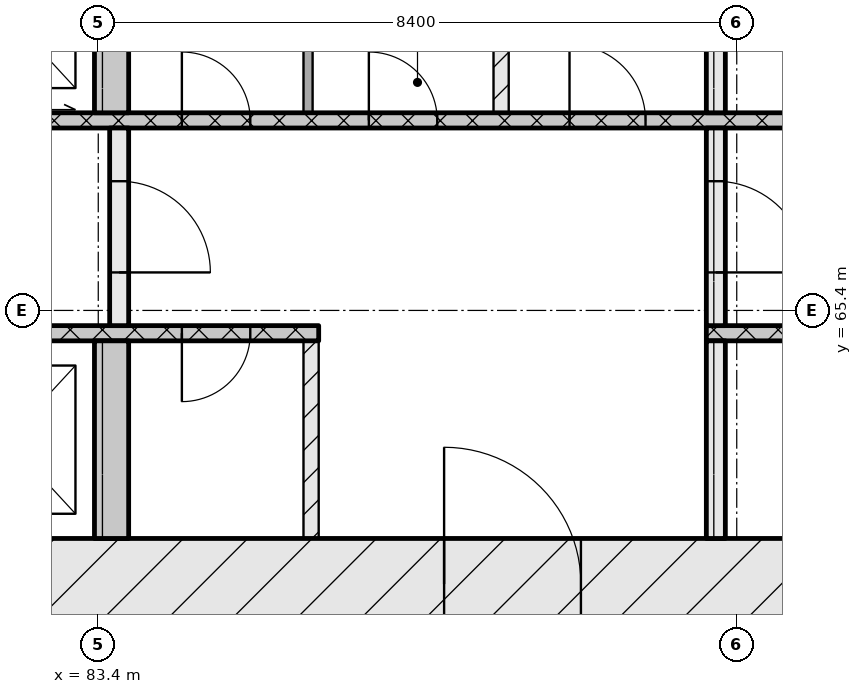
"""IFC4 building model, lengths in metres.
Left out: names, types, materials, properties, quantities, classifications, styles, units other than length and angle.
Written with IfcOpenShell. Run it as: python <this file> out.ifc"""

import sys

from ifc_helpers import new_model, si_unit, direction, frame, frame_2d, origin, place, context, subcontext, project, spatial, rectangle, extrude, element, fill, save


model = new_model("IFC4")
c1 = context("Model", 3, precision=1e-05, world=origin(), true_north=direction((0.0, 1.0)))
c2 = subcontext(c1, "Body", "Model", "MODEL_VIEW")
j1 = project(units=[si_unit("LENGTHUNIT", "METRE"), si_unit("PLANEANGLEUNIT", "RADIAN")], contexts=[c1])
p1 = place(None, origin())
s1 = spatial("IfcSite", under=j1, at=p1, CompositionType="ELEMENT")
p2 = place(p1, origin())
s2 = spatial("IfcBuilding", under=s1, at=p2, CompositionType="ELEMENT")
p3 = place(p2, frame((0.0, 0.0, 40.8)))
s3 = spatial("IfcBuildingStorey", under=s2, at=p3, CompositionType="ELEMENT", Elevation=40.8)
p4 = place(p3, frame((66.6, 61.8, 0.0), z_axis=(0.0, 0.0, 1.0), x_axis=(1.0, 0.0, 0.0)))
e1 = element("IfcWall", 1, at=p4, inside=s3, PredefinedType="SOLIDWALL", context=c2, shape_type="SweptSolid", body=[
    extrude(rectangle(XDim=42.0, YDim=1.2, at=frame_2d((21.0, 0.0))), origin(), (0.0, 0.0, 1.0), 3.32),
])
p5 = place(p4, frame((21.35, 0.0, 0.0)))
e2 = element("IfcOpeningElement", 2, at=p5, cuts=e1, PredefinedType="OPENING", context=c2, shape_type="SweptSolid", body=[
    extrude(rectangle(XDim=1.8, YDim=2.1, at=frame_2d((0.9, 1.05))), frame((0.0, 0.61, 0.0), z_axis=(0.0, -1.0, 0.0), x_axis=(1.0, 0.0, 0.0)), (0.0, 0.0, 1.0), 1.22),
])
p6 = place(p3, frame((83.575, 62.4, 0.0), z_axis=(0.0, 0.0, 1.0), x_axis=(0.0, 1.0, 0.0)))
e3 = element("IfcWall", 3, at=p6, inside=s3, PredefinedType="SOLIDWALL", context=c2, shape_type="SweptSolid", body=[
    extrude(rectangle(XDim=2.6, YDim=0.45, at=frame_2d((1.3, 0.0))), origin(), (0.0, 0.0, 1.0), 3.32),
])
p7 = place(p3, frame((86.2, 62.4, 0.0), z_axis=(0.0, 0.0, 1.0), x_axis=(0.0, 1.0, 0.0)))
e4 = element("IfcWall", 4, at=p7, inside=s3, PredefinedType="PARTITIONING", context=c2, shape_type="SweptSolid", body=[
    extrude(rectangle(XDim=2.6, YDim=0.2, at=frame_2d((1.3, 0.0))), origin(), (0.0, 0.0, 1.0), 3.32),
])
p8 = place(p3, frame((91.525, 62.4, 0.0), z_axis=(0.0, 0.0, 1.0), x_axis=(0.0, 1.0, 0.0)))
e5 = element("IfcWall", 5, at=p8, inside=s3, PredefinedType="SOLIDWALL", context=c2, shape_type="SweptSolid", body=[
    extrude(rectangle(XDim=2.6, YDim=0.25, at=frame_2d((1.3, 0.0))), origin(), (0.0, 0.0, 1.0), 3.32),
])
p9 = place(p3, frame((67.8, 65.1, 0.0), z_axis=(0.0, 0.0, 1.0), x_axis=(1.0, 0.0, 0.0)))
e6 = element("IfcWall", 6, at=p9, inside=s3, PredefinedType="SOLIDWALL", context=c2, shape_type="SweptSolid", body=[
    extrude(rectangle(XDim=18.5, YDim=0.2, at=frame_2d((9.25, 0.0))), origin(), (0.0, 0.0, 1.0), 3.32),
])
p10 = place(p9, frame((7.27, 0.0, 0.0)))
e7 = element("IfcOpeningElement", 7, at=p10, cuts=e6, PredefinedType="OPENING", context=c2, shape_type="SweptSolid", body=[
    extrude(rectangle(XDim=0.9, YDim=2.1, at=frame_2d((0.45, 1.05))), frame((0.0, 0.11, 0.0), z_axis=(0.0, -1.0, 0.0), x_axis=(1.0, 0.0, 0.0)), (0.0, 0.0, 1.0), 0.22),
])
p11 = place(p9, frame((8.85, 0.0, 0.0)))
e8 = element("IfcOpeningElement", 8, at=p11, cuts=e6, PredefinedType="OPENING", context=c2, shape_type="SweptSolid", body=[
    extrude(rectangle(XDim=1.1, YDim=2.1, at=frame_2d((0.55, 1.05))), frame((0.0, 0.11, 0.0), z_axis=(0.0, -1.0, 0.0), x_axis=(1.0, 0.0, 0.0)), (0.0, 0.0, 1.0), 0.22),
])
p12 = place(p9, frame((11.35, 0.0, 0.0)))
e9 = element("IfcOpeningElement", 9, at=p12, cuts=e6, PredefinedType="OPENING", context=c2, shape_type="SweptSolid", body=[
    extrude(rectangle(XDim=1.1, YDim=2.1, at=frame_2d((0.55, 1.05))), frame((0.0, 0.11, 0.0), z_axis=(0.0, -1.0, 0.0), x_axis=(1.0, 0.0, 0.0)), (0.0, 0.0, 1.0), 0.22),
])
p13 = place(p9, frame((13.85, 0.0, 0.0)))
e10 = element("IfcOpeningElement", 10, at=p13, cuts=e6, PredefinedType="OPENING", context=c2, shape_type="SweptSolid", body=[
    extrude(rectangle(XDim=1.1, YDim=2.1, at=frame_2d((0.55, 1.05))), frame((0.0, 0.11, 0.0), z_axis=(0.0, -1.0, 0.0), x_axis=(1.0, 0.0, 0.0)), (0.0, 0.0, 1.0), 0.22),
])
p14 = place(p9, frame((16.7, 0.0, 0.0)))
e11 = element("IfcOpeningElement", 11, at=p14, cuts=e6, PredefinedType="OPENING", context=c2, shape_type="SweptSolid", body=[
    extrude(rectangle(XDim=0.9, YDim=2.1, at=frame_2d((0.45, 1.05))), frame((0.0, 0.11, 0.0), z_axis=(0.0, -1.0, 0.0), x_axis=(1.0, 0.0, 0.0)), (0.0, 0.0, 1.0), 0.22),
])
p15 = place(p3, frame((91.4, 65.1, 0.0), z_axis=(0.0, 0.0, 1.0), x_axis=(1.0, 0.0, 0.0)))
e12 = element("IfcWall", 12, at=p15, inside=s3, PredefinedType="SOLIDWALL", context=c2, shape_type="SweptSolid", body=[
    extrude(rectangle(XDim=16.0, YDim=0.2, at=frame_2d((8.0, 0.0))), origin(), (0.0, 0.0, 1.0), 3.32),
])
p16 = place(p15, frame((7.83, 0.0, 0.0)))
e13 = element("IfcOpeningElement", 13, at=p16, cuts=e12, PredefinedType="OPENING", context=c2, shape_type="SweptSolid", body=[
    extrude(rectangle(XDim=0.9, YDim=2.1, at=frame_2d((0.45, 1.05))), frame((0.0, 0.11, 0.0), z_axis=(0.0, -1.0, 0.0), x_axis=(1.0, 0.0, 0.0)), (0.0, 0.0, 1.0), 0.22),
])
p17 = place(p3, frame((83.675, 65.2, 0.0), z_axis=(0.0, 0.0, 1.0), x_axis=(0.0, 1.0, 0.0)))
e14 = element("IfcWall", 14, at=p17, inside=s3, PredefinedType="SOLIDWALL", context=c2, shape_type="SweptSolid", body=[
    extrude(rectangle(XDim=2.6, YDim=0.25, at=frame_2d((1.3, 0.0))), origin(), (0.0, 0.0, 1.0), 3.32),
])
p18 = place(p17, frame((0.7, 0.0, 0.0)))
e15 = element("IfcOpeningElement", 15, at=p18, cuts=e14, PredefinedType="OPENING", context=c2, shape_type="SweptSolid", body=[
    extrude(rectangle(XDim=1.2, YDim=2.1, at=frame_2d((0.6, 1.05))), frame((0.0, 0.135, 0.0), z_axis=(0.0, -1.0, 0.0), x_axis=(1.0, 0.0, 0.0)), (0.0, 0.0, 1.0), 0.27),
])
p19 = place(p3, frame((91.525, 65.2, 0.0), z_axis=(0.0, 0.0, 1.0), x_axis=(0.0, 1.0, 0.0)))
e16 = element("IfcWall", 16, at=p19, inside=s3, PredefinedType="SOLIDWALL", context=c2, shape_type="SweptSolid", body=[
    extrude(rectangle(XDim=2.6, YDim=0.25, at=frame_2d((1.3, 0.0))), origin(), (0.0, 0.0, 1.0), 3.32),
])
p20 = place(p19, frame((0.7, 0.0, 0.0)))
e17 = element("IfcOpeningElement", 17, at=p20, cuts=e16, PredefinedType="OPENING", context=c2, shape_type="SweptSolid", body=[
    extrude(rectangle(XDim=1.2, YDim=2.1, at=frame_2d((0.6, 1.05))), frame((0.0, 0.135, 0.0), z_axis=(0.0, -1.0, 0.0), x_axis=(1.0, 0.0, 0.0)), (0.0, 0.0, 1.0), 0.27),
])
p21 = place(p3, frame((76.05, 67.9, 0.0), z_axis=(0.0, 0.0, 1.0), x_axis=(1.0, 0.0, 0.0)))
e18 = element("IfcWall", 18, at=p21, inside=s3, PredefinedType="SOLIDWALL", context=c2, shape_type="SweptSolid", body=[
    extrude(rectangle(XDim=23.1, YDim=0.2, at=frame_2d((11.55, 0.0))), origin(), (0.0, 0.0, 1.0), 3.32),
])
p22 = place(p21, frame((0.6, 0.0, 0.0)))
e19 = element("IfcOpeningElement", 19, at=p22, cuts=e18, PredefinedType="OPENING", context=c2, shape_type="SweptSolid", body=[
    extrude(rectangle(XDim=1.1, YDim=2.1, at=frame_2d((0.55, 1.05))), frame((0.0, 0.11, 0.0), z_axis=(0.0, -1.0, 0.0), x_axis=(1.0, 0.0, 0.0)), (0.0, 0.0, 1.0), 0.22),
])
p23 = place(p21, frame((3.1, 0.0, 0.0)))
e20 = element("IfcOpeningElement", 20, at=p23, cuts=e18, PredefinedType="OPENING", context=c2, shape_type="SweptSolid", body=[
    extrude(rectangle(XDim=1.1, YDim=2.1, at=frame_2d((0.55, 1.05))), frame((0.0, 0.11, 0.0), z_axis=(0.0, -1.0, 0.0), x_axis=(1.0, 0.0, 0.0)), (0.0, 0.0, 1.0), 0.22),
])
p24 = place(p21, frame((5.6, 0.0, 0.0)))
e21 = element("IfcOpeningElement", 21, at=p24, cuts=e18, PredefinedType="OPENING", context=c2, shape_type="SweptSolid", body=[
    extrude(rectangle(XDim=1.1, YDim=2.1, at=frame_2d((0.55, 1.05))), frame((0.0, 0.11, 0.0), z_axis=(0.0, -1.0, 0.0), x_axis=(1.0, 0.0, 0.0)), (0.0, 0.0, 1.0), 0.22),
])
p25 = place(p21, frame((8.45, 0.0, 0.0)))
e22 = element("IfcOpeningElement", 22, at=p25, cuts=e18, PredefinedType="OPENING", context=c2, shape_type="SweptSolid", body=[
    extrude(rectangle(XDim=0.9, YDim=2.1, at=frame_2d((0.45, 1.05))), frame((0.0, 0.11, 0.0), z_axis=(0.0, -1.0, 0.0), x_axis=(1.0, 0.0, 0.0)), (0.0, 0.0, 1.0), 0.22),
])
p26 = place(p21, frame((10.91, 0.0, 0.0)))
e23 = element("IfcOpeningElement", 23, at=p26, cuts=e18, PredefinedType="OPENING", context=c2, shape_type="SweptSolid", body=[
    extrude(rectangle(XDim=0.9, YDim=2.1, at=frame_2d((0.45, 1.05))), frame((0.0, 0.11, 0.0), z_axis=(0.0, -1.0, 0.0), x_axis=(1.0, 0.0, 0.0)), (0.0, 0.0, 1.0), 0.22),
])
p27 = place(p21, frame((13.55, 0.0, 0.0)))
e24 = element("IfcOpeningElement", 24, at=p27, cuts=e18, PredefinedType="OPENING", context=c2, shape_type="SweptSolid", body=[
    extrude(rectangle(XDim=1.0, YDim=2.1, at=frame_2d((0.5, 1.05))), frame((0.0, 0.11, 0.0), z_axis=(0.0, -1.0, 0.0), x_axis=(1.0, 0.0, 0.0)), (0.0, 0.0, 1.0), 0.22),
])
p28 = place(p3, frame((83.575, 68.0, 0.0), z_axis=(0.0, 0.0, 1.0), x_axis=(0.0, 1.0, 0.0)))
e25 = element("IfcWall", 25, at=p28, inside=s3, PredefinedType="SOLIDWALL", context=c2, shape_type="SweptSolid", body=[
    extrude(rectangle(XDim=2.6, YDim=0.45, at=frame_2d((1.3, 0.0))), origin(), (0.0, 0.0, 1.0), 3.32),
])
p29 = place(p3, frame((86.16, 68.0, 0.0), z_axis=(0.0, 0.0, 1.0), x_axis=(0.0, 1.0, 0.0)))
e26 = element("IfcWall", 26, at=p29, inside=s3, PredefinedType="PARTITIONING", context=c2, shape_type="SweptSolid", body=[
    extrude(rectangle(XDim=2.6, YDim=0.12, at=frame_2d((1.3, 0.0))), origin(), (0.0, 0.0, 1.0), 3.32),
])
p30 = place(p3, frame((88.7, 68.0, 0.0), z_axis=(0.0, 0.0, 1.0), x_axis=(0.0, 1.0, 0.0)))
e27 = element("IfcWall", 27, at=p30, inside=s3, PredefinedType="PARTITIONING", context=c2, shape_type="SweptSolid", body=[
    extrude(rectangle(XDim=2.6, YDim=0.2, at=frame_2d((1.3, 0.0))), origin(), (0.0, 0.0, 1.0), 3.32),
])
p31 = place(p3, frame((91.525, 68.0, 0.0), z_axis=(0.0, 0.0, 1.0), x_axis=(0.0, 1.0, 0.0)))
e28 = element("IfcWall", 28, at=p31, inside=s3, PredefinedType="SOLIDWALL", context=c2, shape_type="SweptSolid", body=[
    extrude(rectangle(XDim=2.6, YDim=0.25, at=frame_2d((1.3, 0.0))), origin(), (0.0, 0.0, 1.0), 3.32),
])
p32 = place(p5, origin())
e29 = element("IfcDoor", 29, at=p32, inside=s3, OperationType="DOUBLE_DOOR_SINGLE_SWING", PredefinedType="DOOR", context=c2, shape_type="SweptSolid", body=[
    extrude(rectangle(XDim=1.8, YDim=2.1, at=frame_2d((0.9, 1.05))), frame((0.0, 0.025, 0.0), z_axis=(0.0, -1.0, 0.0), x_axis=(1.0, 0.0, 0.0)), (0.0, 0.0, 1.0), 0.05),
])
fill(e2, e29)
p33 = place(p14, origin())
e30 = element("IfcDoor", 30, at=p33, inside=s3, OperationType="SINGLE_SWING_RIGHT", PredefinedType="DOOR", context=c2, shape_type="SweptSolid", body=[
    extrude(rectangle(XDim=0.9, YDim=2.1, at=frame_2d((0.45, 1.05))), frame((0.0, 0.025, 0.0), z_axis=(0.0, -1.0, 0.0), x_axis=(1.0, 0.0, 0.0)), (0.0, 0.0, 1.0), 0.05),
])
fill(e11, e30)
p34 = place(p18, origin())
e31 = element("IfcDoor", 31, at=p34, inside=s3, OperationType="SINGLE_SWING_RIGHT", PredefinedType="DOOR", context=c2, shape_type="SweptSolid", body=[
    extrude(rectangle(XDim=1.2, YDim=2.1, at=frame_2d((0.6, 1.05))), frame((0.0, 0.025, 0.0), z_axis=(0.0, -1.0, 0.0), x_axis=(1.0, 0.0, 0.0)), (0.0, 0.0, 1.0), 0.05),
])
fill(e15, e31)
p35 = place(p20, origin())
e32 = element("IfcDoor", 32, at=p35, inside=s3, OperationType="SINGLE_SWING_RIGHT", PredefinedType="DOOR", context=c2, shape_type="SweptSolid", body=[
    extrude(rectangle(XDim=1.2, YDim=2.1, at=frame_2d((0.6, 1.05))), frame((0.0, 0.025, 0.0), z_axis=(0.0, -1.0, 0.0), x_axis=(1.0, 0.0, 0.0)), (0.0, 0.0, 1.0), 0.05),
])
fill(e17, e32)
p36 = place(p25, origin())
e33 = element("IfcDoor", 33, at=p36, inside=s3, OperationType="SINGLE_SWING_LEFT", PredefinedType="DOOR", context=c2, shape_type="SweptSolid", body=[
    extrude(rectangle(XDim=0.9, YDim=2.1, at=frame_2d((0.45, 1.05))), frame((0.0, 0.025, 0.0), z_axis=(0.0, -1.0, 0.0), x_axis=(1.0, 0.0, 0.0)), (0.0, 0.0, 1.0), 0.05),
])
fill(e22, e33)
p37 = place(p26, origin())
e34 = element("IfcDoor", 34, at=p37, inside=s3, OperationType="SINGLE_SWING_LEFT", PredefinedType="DOOR", context=c2, shape_type="SweptSolid", body=[
    extrude(rectangle(XDim=0.9, YDim=2.1, at=frame_2d((0.45, 1.05))), frame((0.0, 0.025, 0.0), z_axis=(0.0, -1.0, 0.0), x_axis=(1.0, 0.0, 0.0)), (0.0, 0.0, 1.0), 0.05),
])
fill(e23, e34)
p38 = place(p27, origin())
e35 = element("IfcDoor", 35, at=p38, inside=s3, OperationType="SINGLE_SWING_LEFT", PredefinedType="DOOR", context=c2, shape_type="SweptSolid", body=[
    extrude(rectangle(XDim=1.0, YDim=2.1, at=frame_2d((0.5, 1.05))), frame((0.0, 0.025, 0.0), z_axis=(0.0, -1.0, 0.0), x_axis=(1.0, 0.0, 0.0)), (0.0, 0.0, 1.0), 0.05),
])
fill(e24, e35)
save(model, sys.argv[1])
